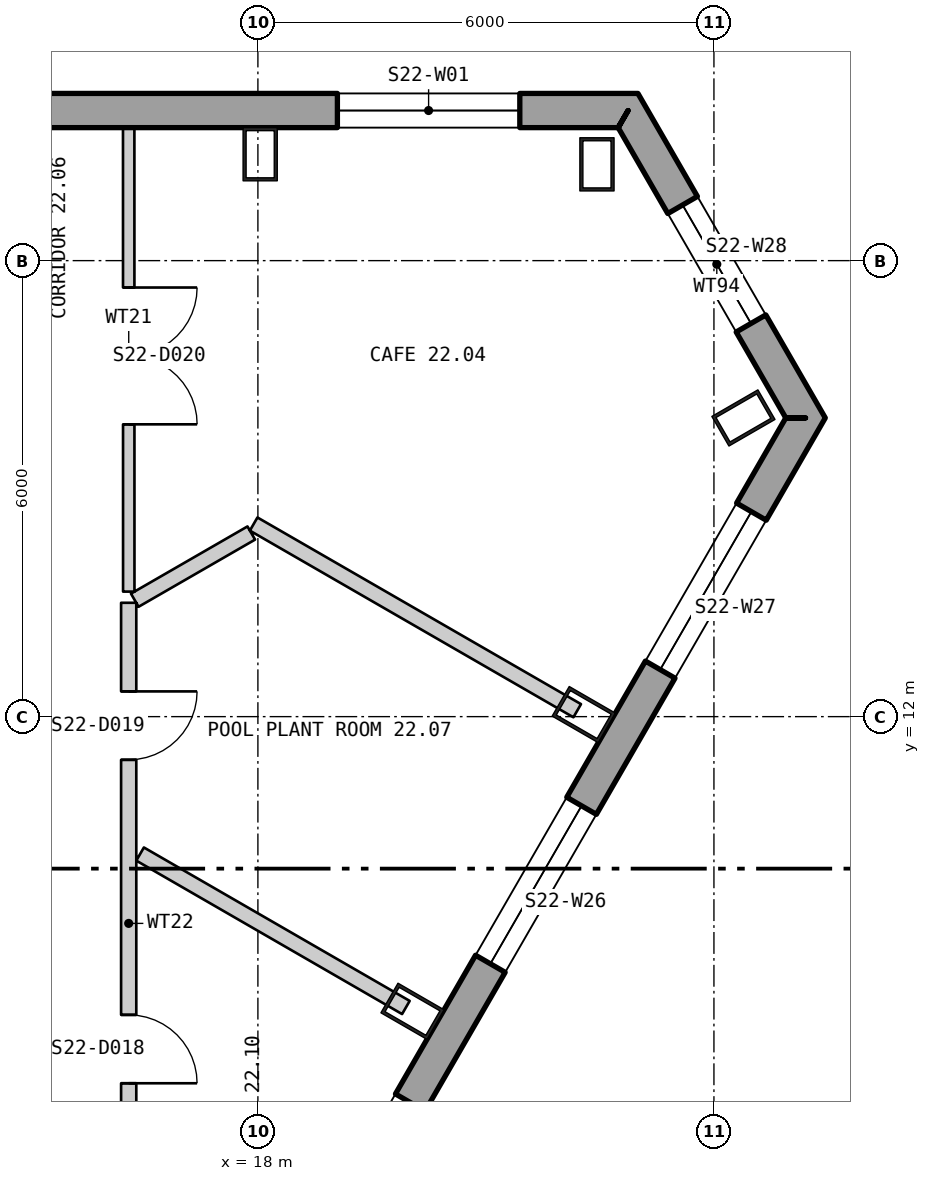
"""IFC4 building model, lengths in metres.
Left out: names, types, materials, properties, quantities, classifications, styles, units other than length and angle.
Written with IfcOpenShell. Run it as: python <this file> out.ifc"""

import sys

from ifc_helpers import new_model, si_unit, direction, frame, frame_2d, origin, origin_2d, place, context, subcontext, project, spatial, polyline, rectangle, hollow_rectangle, outline, extrude, element, fill, save


model = new_model("IFC4")
c1 = context("Model", 3, precision=1e-05, world=origin(), true_north=direction((0.0, 1.0)))
c2 = subcontext(c1, "Body", "Model", "MODEL_VIEW")
j1 = project(units=[si_unit("LENGTHUNIT", "METRE"), si_unit("PLANEANGLEUNIT", "RADIAN")], contexts=[c1])
p1 = place(None, origin())
s1 = spatial("IfcSite", under=j1, at=p1, CompositionType="ELEMENT")
p2 = place(p1, origin())
s2 = spatial("IfcBuilding", under=s1, at=p2, CompositionType="ELEMENT")
p3 = place(p2, frame((0.0, 0.0, 298.2)))
s3 = spatial("IfcBuildingStorey", under=s2, at=p3, CompositionType="ELEMENT", Elevation=298.2)
for number, where, z_axis, x_axis in (
    (1, (22.461, 19.267, 0.0), (0.0, 0.0, 1.0), (-1.0, 0.0, 0.0)),
    (2, (18.03, 19.4, 0.0), (0.0, 0.0, 1.0), (-1.0, 0.0, 0.0)),
    (3, (20.034, 8.123, 0.0), (0.0, 0.0, 1.0), (0.5, 0.866, 0.0)),
    (4, (22.287, 12.027, 0.0), (0.0, 0.0, 1.0), (0.5, 0.866, 0.0)),
    (5, (24.388, 15.93, 0.0), (0.0, 0.0, 1.0), (-0.5, 0.866, 0.0)),
):
    element("IfcColumn", number, at=place(p3, frame(where, z_axis=z_axis, x_axis=x_axis)), inside=s3, PredefinedType="COLUMN", context=c2, shape_type="SweptSolid", body=[
        extrude(hollow_rectangle(XDim=0.45, YDim=0.7, WallThickness=0.04, at=origin_2d()), origin(), (0.0, 0.0, 1.0), 6.0),
    ])
p4 = place(p3, frame((22.87, 19.975, -0.4), z_axis=(0.0, 0.0, 1.0), x_axis=(-1.0, 0.0, 0.0)))
e6 = element("IfcWall", 6, at=p4, inside=s3, PredefinedType="SOLIDWALL", context=c2, shape_type="SweptSolid", body=[
    extrude(outline(polyline([(-0.13, -0.225), (45.87, -0.225), (45.61, 0.225), (0.13, 0.225), (-0.13, -0.225)])), origin(), (0.0, 0.0, 1.0), 6.0),
])
p5 = place(p4, frame((1.424, 0.0, 1.3)))
e7 = element("IfcOpeningElement", 7, at=p5, cuts=e6, PredefinedType="OPENING", context=c2, shape_type="SweptSolid", body=[
    extrude(rectangle(XDim=2.4, YDim=4.1, at=frame_2d((1.2, 2.05))), frame((0.0, 0.235, 0.0), z_axis=(0.0, -1.0, 0.0), x_axis=(1.0, 0.0, 0.0)), (0.0, 0.0, 1.0), 0.47),
])
p6 = place(p4, frame((14.909, 0.0, 1.3)))
e8 = element("IfcOpeningElement", 8, at=p6, cuts=e6, PredefinedType="OPENING", context=c2, shape_type="SweptSolid", body=[
    extrude(rectangle(XDim=2.4, YDim=4.1, at=frame_2d((1.2, 2.05))), frame((0.0, 0.235, 0.0), z_axis=(0.0, -1.0, 0.0), x_axis=(1.0, 0.0, 0.0)), (0.0, 0.0, 1.0), 0.47),
])
p7 = place(p4, frame((19.416, 0.0, 1.3)))
e9 = element("IfcOpeningElement", 9, at=p7, cuts=e6, PredefinedType="OPENING", context=c2, shape_type="SweptSolid", body=[
    extrude(rectangle(XDim=2.4, YDim=4.1, at=frame_2d((1.2, 2.05))), frame((0.0, 0.235, 0.0), z_axis=(0.0, -1.0, 0.0), x_axis=(1.0, 0.0, 0.0)), (0.0, 0.0, 1.0), 0.47),
])
p8 = place(p4, frame((23.924, 0.0, 1.3)))
e10 = element("IfcOpeningElement", 10, at=p8, cuts=e6, PredefinedType="OPENING", context=c2, shape_type="SweptSolid", body=[
    extrude(rectangle(XDim=2.4, YDim=4.1, at=frame_2d((1.2, 2.05))), frame((0.0, 0.235, 0.0), z_axis=(0.0, -1.0, 0.0), x_axis=(1.0, 0.0, 0.0)), (0.0, 0.0, 1.0), 0.47),
])
p9 = place(p4, frame((28.431, 0.0, 1.3)))
e11 = element("IfcOpeningElement", 11, at=p9, cuts=e6, PredefinedType="OPENING", context=c2, shape_type="SweptSolid", body=[
    extrude(rectangle(XDim=2.4, YDim=4.1, at=frame_2d((1.2, 2.05))), frame((0.0, 0.235, 0.0), z_axis=(0.0, -1.0, 0.0), x_axis=(1.0, 0.0, 0.0)), (0.0, 0.0, 1.0), 0.47),
])
p10 = place(p4, frame((32.939, 0.0, 1.3)))
e12 = element("IfcOpeningElement", 12, at=p10, cuts=e6, PredefinedType="OPENING", context=c2, shape_type="SweptSolid", body=[
    extrude(rectangle(XDim=2.4, YDim=4.1, at=frame_2d((1.2, 2.05))), frame((0.0, 0.235, 0.0), z_axis=(0.0, -1.0, 0.0), x_axis=(1.0, 0.0, 0.0)), (0.0, 0.0, 1.0), 0.47),
])
p11 = place(p4, frame((41.916, 0.0, 1.3)))
e13 = element("IfcOpeningElement", 13, at=p11, cuts=e6, PredefinedType="OPENING", context=c2, shape_type="SweptSolid", body=[
    extrude(rectangle(XDim=2.4, YDim=4.1, at=frame_2d((1.2, 2.05))), frame((0.0, 0.235, 0.0), z_axis=(0.0, -1.0, 0.0), x_axis=(1.0, 0.0, 0.0)), (0.0, 0.0, 1.0), 0.47),
])
p12 = place(p3, frame((2.335, -23.682, -0.28), z_axis=(0.0, 0.0, 1.0), x_axis=(0.499999764979, 0.866025539474, 0.0)))
e14 = element("IfcWall", 14, at=p12, inside=s3, PredefinedType="SOLIDWALL", context=c2, shape_type="SweptSolid", body=[
    extrude(outline(polyline([(-0.13, -0.225), (45.87, -0.225), (45.61, 0.225), (0.13, 0.225), (-0.13, -0.225)])), origin(), (0.0, 0.0, 1.0), 6.1),
])
p13 = place(p12, frame((1.424, 0.0, 1.18)))
e15 = element("IfcOpeningElement", 15, at=p13, cuts=e14, PredefinedType="OPENING", context=c2, shape_type="SweptSolid", body=[
    extrude(rectangle(XDim=2.4, YDim=4.1, at=frame_2d((1.2, 2.05))), frame((0.0, 0.235, 0.0), z_axis=(0.0, -1.0, 0.0), x_axis=(1.0, 0.0, 0.0)), (0.0, 0.0, 1.0), 0.47),
])
p14 = place(p12, frame((5.893, 0.0, 1.18)))
e16 = element("IfcOpeningElement", 16, at=p14, cuts=e14, PredefinedType="OPENING", context=c2, shape_type="SweptSolid", body=[
    extrude(rectangle(XDim=2.4, YDim=4.1, at=frame_2d((1.2, 2.05))), frame((0.0, 0.235, 0.0), z_axis=(0.0, -1.0, 0.0), x_axis=(1.0, 0.0, 0.0)), (0.0, 0.0, 1.0), 0.47),
])
p15 = place(p12, frame((10.401, 0.0, 1.18)))
e17 = element("IfcOpeningElement", 17, at=p15, cuts=e14, PredefinedType="OPENING", context=c2, shape_type="SweptSolid", body=[
    extrude(rectangle(XDim=2.4, YDim=4.1, at=frame_2d((1.2, 2.05))), frame((0.0, 0.235, 0.0), z_axis=(0.0, -1.0, 0.0), x_axis=(1.0, 0.0, 0.0)), (0.0, 0.0, 1.0), 0.47),
])
p16 = place(p12, frame((14.909, 0.0, 1.18)))
e18 = element("IfcOpeningElement", 18, at=p16, cuts=e14, PredefinedType="OPENING", context=c2, shape_type="SweptSolid", body=[
    extrude(rectangle(XDim=2.4, YDim=4.1, at=frame_2d((1.2, 2.05))), frame((0.0, 0.235, 0.0), z_axis=(0.0, -1.0, 0.0), x_axis=(1.0, 0.0, 0.0)), (0.0, 0.0, 1.0), 0.47),
])
p17 = place(p12, frame((19.716, 0.0, 0.28)))
e19 = element("IfcOpeningElement", 19, at=p17, cuts=e14, PredefinedType="OPENING", context=c2, shape_type="SweptSolid", body=[
    extrude(rectangle(XDim=1.8, YDim=2.4, at=frame_2d((0.9, 1.2))), frame((0.0, 0.235, 0.0), z_axis=(0.0, -1.0, 0.0), x_axis=(1.0, 0.0, 0.0)), (0.0, 0.0, 1.0), 0.47),
])
p18 = place(p12, frame((24.224, 0.0, 0.28)))
e20 = element("IfcOpeningElement", 20, at=p18, cuts=e14, PredefinedType="OPENING", context=c2, shape_type="SweptSolid", body=[
    extrude(rectangle(XDim=1.8, YDim=2.4, at=frame_2d((0.9, 1.2))), frame((0.0, 0.235, 0.0), z_axis=(0.0, -1.0, 0.0), x_axis=(1.0, 0.0, 0.0)), (0.0, 0.0, 1.0), 0.47),
])
p19 = place(p12, frame((28.431, 0.0, 1.18)))
e21 = element("IfcOpeningElement", 21, at=p19, cuts=e14, PredefinedType="OPENING", context=c2, shape_type="SweptSolid", body=[
    extrude(rectangle(XDim=2.4, YDim=4.1, at=frame_2d((1.2, 2.05))), frame((0.0, 0.235, 0.0), z_axis=(0.0, -1.0, 0.0), x_axis=(1.0, 0.0, 0.0)), (0.0, 0.0, 1.0), 0.47),
])
p20 = place(p12, frame((32.939, 0.0, 1.18)))
e22 = element("IfcOpeningElement", 22, at=p20, cuts=e14, PredefinedType="OPENING", context=c2, shape_type="SweptSolid", body=[
    extrude(rectangle(XDim=2.4, YDim=4.1, at=frame_2d((1.2, 2.05))), frame((0.0, 0.235, 0.0), z_axis=(0.0, -1.0, 0.0), x_axis=(1.0, 0.0, 0.0)), (0.0, 0.0, 1.0), 0.47),
])
p21 = place(p12, frame((37.447, 0.0, 1.18)))
e23 = element("IfcOpeningElement", 23, at=p21, cuts=e14, PredefinedType="OPENING", context=c2, shape_type="SweptSolid", body=[
    extrude(rectangle(XDim=2.4, YDim=4.1, at=frame_2d((1.2, 2.05))), frame((0.0, 0.235, 0.0), z_axis=(0.0, -1.0, 0.0), x_axis=(1.0, 0.0, 0.0)), (0.0, 0.0, 1.0), 0.47),
])
p22 = place(p12, frame((41.916, 0.0, 1.18)))
e24 = element("IfcOpeningElement", 24, at=p22, cuts=e14, PredefinedType="OPENING", context=c2, shape_type="SweptSolid", body=[
    extrude(rectangle(XDim=2.4, YDim=4.1, at=frame_2d((1.2, 2.05))), frame((0.0, 0.235, 0.0), z_axis=(0.0, -1.0, 0.0), x_axis=(1.0, 0.0, 0.0)), (0.0, 0.0, 1.0), 0.47),
])
p23 = place(p3, frame((25.205, 15.931, -0.4), z_axis=(0.0, 0.0, 1.0), x_axis=(-0.500001097856, 0.866024769936, 0.0)))
e25 = element("IfcWall", 25, at=p23, inside=s3, PredefinedType="SOLIDWALL", context=c2, shape_type="SweptSolid", body=[
    extrude(outline(polyline([(-0.13, -0.225), (4.8, -0.225), (4.54, 0.225), (0.13, 0.225), (-0.13, -0.225)])), origin(), (0.0, 0.0, 1.0), 6.0),
])
p24 = place(p23, frame((1.435, 0.0, 1.3)))
e26 = element("IfcOpeningElement", 26, at=p24, cuts=e25, PredefinedType="OPENING", context=c2, shape_type="SweptSolid", body=[
    extrude(rectangle(XDim=1.8, YDim=4.1, at=frame_2d((0.9, 2.05))), frame((0.0, 0.235, 0.0), z_axis=(0.0, -1.0, 0.0), x_axis=(1.0, 0.0, 0.0)), (0.0, 0.0, 1.0), 0.47),
])
p25 = place(p3, frame((16.3, 5.061, 0.0), z_axis=(0.0, 0.0, 1.0), x_axis=(0.0, 1.0, 0.0)))
e27 = element("IfcWall", 27, at=p25, inside=s3, PredefinedType="PARTITIONING", context=c2, shape_type="SweptSolid", body=[
    extrude(rectangle(XDim=8.437, YDim=0.2, at=frame_2d((4.218, 0.0))), origin(), (0.0, 0.0, 1.0), 5.8),
])
p26 = place(p25, frame((2.115, 0.0, 0.0)))
e28 = element("IfcOpeningElement", 28, at=p26, cuts=e27, PredefinedType="OPENING", context=c2, shape_type="SweptSolid", body=[
    extrude(rectangle(XDim=0.9, YDim=2.1, at=frame_2d((0.45, 1.05))), frame((0.0, 0.11, 0.0), z_axis=(0.0, -1.0, 0.0), x_axis=(1.0, 0.0, 0.0)), (0.0, 0.0, 1.0), 0.22),
])
p27 = place(p25, frame((6.371, 0.0, 0.0)))
e29 = element("IfcOpeningElement", 29, at=p27, cuts=e27, PredefinedType="OPENING", context=c2, shape_type="SweptSolid", body=[
    extrude(rectangle(XDim=0.9, YDim=2.1, at=frame_2d((0.45, 1.05))), frame((0.0, 0.11, 0.0), z_axis=(0.0, -1.0, 0.0), x_axis=(1.0, 0.0, 0.0)), (0.0, 0.0, 1.0), 0.22),
])
p28 = place(p3, frame((16.3, 19.748, 0.0), z_axis=(0.0, 0.0, 1.0), x_axis=(0.00016385384, -0.999999986576, 0.0)))
e30 = element("IfcWall", 30, at=p28, inside=s3, PredefinedType="PARTITIONING", context=c2, shape_type="SweptSolid", body=[
    extrude(rectangle(XDim=6.103, YDim=0.15, at=frame_2d((3.051, 0.0))), origin(), (0.0, 0.0, 1.0), 5.8),
])
p29 = place(p28, frame((2.102, 0.0, 0.0)))
e31 = element("IfcOpeningElement", 31, at=p29, cuts=e30, PredefinedType="OPENING", context=c2, shape_type="SweptSolid", body=[
    extrude(rectangle(XDim=1.8, YDim=2.1, at=frame_2d((0.9, 1.05))), frame((0.0, 0.085, 0.0), z_axis=(0.0, -1.0, 0.0), x_axis=(1.0, 0.0, 0.0)), (0.0, 0.0, 1.0), 0.17),
])
p30 = place(p3, frame((16.38, 13.532, 0.0), z_axis=(0.0, 0.0, 1.0), x_axis=(0.866289053052, 0.499543067775, 0.0)))
e32 = element("IfcWall", 32, at=p30, inside=s3, PredefinedType="PARTITIONING", context=c2, shape_type="SweptSolid", body=[
    extrude(rectangle(XDim=1.77, YDim=0.2, at=frame_2d((0.885, 0.0))), origin(), (0.0, 0.0, 1.0), 5.8),
])
p31 = place(p3, frame((16.45, 10.192, 0.0), z_axis=(0.0, 0.0, 1.0), x_axis=(0.866024748725, -0.500001134594, 0.0)))
e33 = element("IfcWall", 33, at=p31, inside=s3, PredefinedType="PARTITIONING", context=c2, shape_type="SweptSolid", body=[
    extrude(rectangle(XDim=4.038, YDim=0.2, at=frame_2d((2.019, 0.0))), origin(), (0.0, 0.0, 1.0), 5.8),
])
p32 = place(p3, frame((17.944, 14.534, 0.0), z_axis=(0.0, 0.0, 1.0), x_axis=(0.866182198585, -0.499728325047, 0.0)))
e34 = element("IfcWall", 34, at=p32, inside=s3, PredefinedType="PARTITIONING", context=c2, shape_type="SweptSolid", body=[
    extrude(rectangle(XDim=4.915, YDim=0.2, at=frame_2d((2.457, 0.0))), origin(), (0.0, 0.0, 1.0), 5.8),
])
p33 = place(p5, origin())
e35 = element("IfcWindow", 35, at=p33, inside=s3, PartitioningType="SINGLE_PANEL", PredefinedType="WINDOW", context=c2, shape_type="SweptSolid", body=[
    extrude(rectangle(XDim=2.4, YDim=4.1, at=frame_2d((1.2, 2.05))), frame((0.0, 0.105, 0.0), z_axis=(0.0, -1.0, 0.0), x_axis=(1.0, 0.0, 0.0)), (0.0, 0.0, 1.0), 0.06),
])
fill(e7, e35)
p34 = place(p20, origin())
e36 = element("IfcWindow", 36, at=p34, inside=s3, PartitioningType="SINGLE_PANEL", PredefinedType="WINDOW", context=c2, shape_type="SweptSolid", body=[
    extrude(rectangle(XDim=2.4, YDim=4.1, at=frame_2d((1.2, 2.05))), frame((0.0, 0.105, 0.0), z_axis=(0.0, -1.0, 0.0), x_axis=(1.0, 0.0, 0.0)), (0.0, 0.0, 1.0), 0.06),
])
fill(e22, e36)
p35 = place(p21, origin())
e37 = element("IfcWindow", 37, at=p35, inside=s3, PartitioningType="SINGLE_PANEL", PredefinedType="WINDOW", context=c2, shape_type="SweptSolid", body=[
    extrude(rectangle(XDim=2.4, YDim=4.1, at=frame_2d((1.2, 2.05))), frame((0.0, 0.105, 0.0), z_axis=(0.0, -1.0, 0.0), x_axis=(1.0, 0.0, 0.0)), (0.0, 0.0, 1.0), 0.06),
])
fill(e23, e37)
p36 = place(p22, origin())
e38 = element("IfcWindow", 38, at=p36, inside=s3, PartitioningType="SINGLE_PANEL", PredefinedType="WINDOW", context=c2, shape_type="SweptSolid", body=[
    extrude(rectangle(XDim=2.4, YDim=4.1, at=frame_2d((1.2, 2.05))), frame((0.0, 0.105, 0.0), z_axis=(0.0, -1.0, 0.0), x_axis=(1.0, 0.0, 0.0)), (0.0, 0.0, 1.0), 0.06),
])
fill(e24, e38)
p37 = place(p24, origin())
e39 = element("IfcWindow", 39, at=p37, inside=s3, PartitioningType="SINGLE_PANEL", PredefinedType="WINDOW", context=c2, shape_type="SweptSolid", body=[
    extrude(rectangle(XDim=1.8, YDim=4.1, at=frame_2d((0.9, 2.05))), frame((0.0, 0.105, 0.0), z_axis=(0.0, -1.0, 0.0), x_axis=(1.0, 0.0, 0.0)), (0.0, 0.0, 1.0), 0.06),
])
fill(e26, e39)
p38 = place(p26, origin())
e40 = element("IfcDoor", 40, at=p38, inside=s3, OperationType="SINGLE_SWING_LEFT", PredefinedType="DOOR", context=c2, shape_type="SweptSolid", body=[
    extrude(rectangle(XDim=0.9, YDim=2.1, at=frame_2d((0.45, 1.05))), frame((0.0, 0.025, 0.0), z_axis=(0.0, -1.0, 0.0), x_axis=(1.0, 0.0, 0.0)), (0.0, 0.0, 1.0), 0.05),
])
fill(e28, e40)
p39 = place(p27, origin())
e41 = element("IfcDoor", 41, at=p39, inside=s3, OperationType="SINGLE_SWING_RIGHT", PredefinedType="DOOR", context=c2, shape_type="SweptSolid", body=[
    extrude(rectangle(XDim=0.9, YDim=2.1, at=frame_2d((0.45, 1.05))), frame((0.0, 0.025, 0.0), z_axis=(0.0, -1.0, 0.0), x_axis=(1.0, 0.0, 0.0)), (0.0, 0.0, 1.0), 0.05),
])
fill(e29, e41)
p40 = place(p29, origin())
e42 = element("IfcDoor", 42, at=p40, inside=s3, OperationType="DOUBLE_DOOR_SINGLE_SWING", PredefinedType="DOOR", context=c2, shape_type="SweptSolid", body=[
    extrude(rectangle(XDim=1.8, YDim=2.1, at=frame_2d((0.9, 1.05))), frame((0.0, 0.025, 0.0), z_axis=(0.0, -1.0, 0.0), x_axis=(1.0, 0.0, 0.0)), (0.0, 0.0, 1.0), 0.05),
])
fill(e31, e42)
save(model, sys.argv[1])
